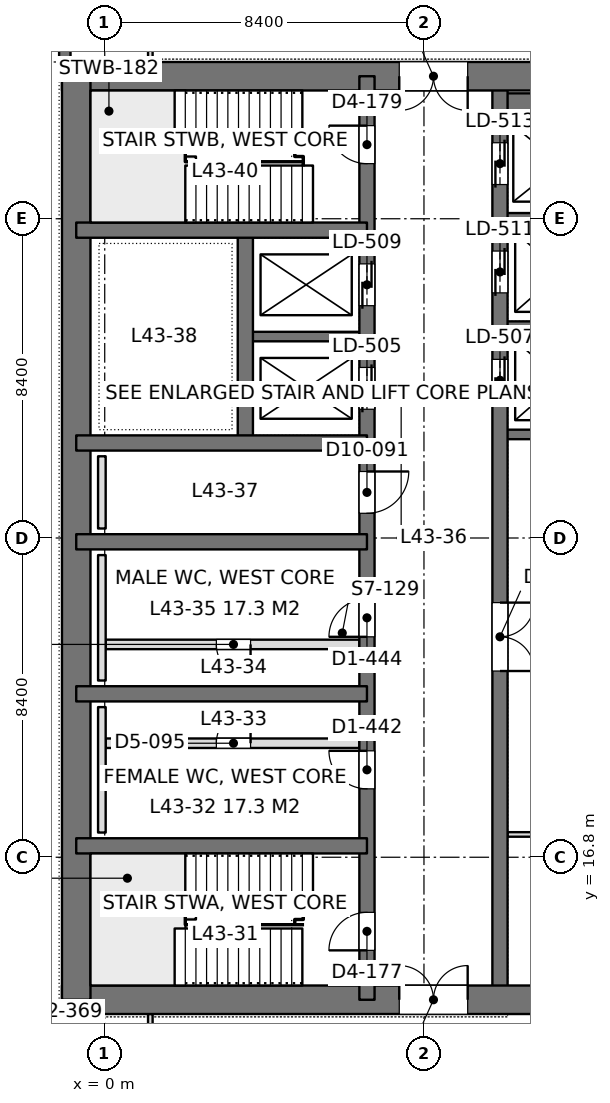
"""IFC4 building model, lengths in metres.
Left out: names, types, materials, properties, quantities, classifications, styles, units other than length and angle.
Written with IfcOpenShell. Run it as: python <this file> out.ifc"""

import sys

from ifc_helpers import new_model, si_unit, direction, frame, frame_2d, origin, place, context, subcontext, project, spatial, rectangle, extrude, element, fill, save


model = new_model("IFC4")
c1 = context("Model", 3, precision=1e-05, world=origin(), true_north=direction((0.0, 1.0)))
c2 = subcontext(c1, "Body", "Model", "MODEL_VIEW")
j1 = project(units=[si_unit("LENGTHUNIT", "METRE"), si_unit("PLANEANGLEUNIT", "RADIAN")], contexts=[c1])
p1 = place(None, origin())
s1 = spatial("IfcSite", under=j1, at=p1, CompositionType="ELEMENT")
p2 = place(p1, origin())
s2 = spatial("IfcBuilding", under=s1, at=p2, CompositionType="ELEMENT")
p3 = place(p2, frame((0.0, 0.0, 190.2)))
s3 = spatial("IfcBuildingStorey", under=s2, at=p3, CompositionType="ELEMENT", Elevation=190.2)
p4 = place(p3, frame((-1.125, 13.05, 0.0), z_axis=(0.0, 0.0, 1.0), x_axis=(1.0, 0.0, 0.0)))
e1 = element("IfcWall", 1, at=p4, inside=s3, PredefinedType="SHEAR", context=c2, shape_type="SweptSolid", body=[
    extrude(rectangle(XDim=17.85, YDim=0.75, at=frame_2d((8.925, 0.0))), origin(), (0.0, 0.0, 1.0), 4.2),
])
p5 = place(p4, frame((8.875, 0.0, 0.0)))
e2 = element("IfcOpeningElement", 2, at=p5, cuts=e1, PredefinedType="OPENING", context=c2, shape_type="SweptSolid", body=[
    extrude(rectangle(XDim=1.8, YDim=2.4, at=frame_2d((0.9, 1.2))), frame((0.0, 0.385, 0.0), z_axis=(0.0, -1.0, 0.0), x_axis=(1.0, 0.0, 0.0)), (0.0, 0.0, 1.0), 0.77),
])
p6 = place(p3, frame((-1.125, 37.35, 0.0), z_axis=(0.0, 0.0, 1.0), x_axis=(1.0, 0.0, 0.0)))
e3 = element("IfcWall", 3, at=p6, inside=s3, PredefinedType="SHEAR", context=c2, shape_type="SweptSolid", body=[
    extrude(rectangle(XDim=17.85, YDim=0.75, at=frame_2d((8.925, 0.0))), origin(), (0.0, 0.0, 1.0), 4.2),
])
p7 = place(p6, frame((8.875, 0.0, 0.0)))
e4 = element("IfcOpeningElement", 4, at=p7, cuts=e3, PredefinedType="OPENING", context=c2, shape_type="SweptSolid", body=[
    extrude(rectangle(XDim=1.8, YDim=2.4, at=frame_2d((0.9, 1.2))), frame((0.0, 0.385, 0.0), z_axis=(0.0, -1.0, 0.0), x_axis=(1.0, 0.0, 0.0)), (0.0, 0.0, 1.0), 0.77),
])
p8 = place(p3, frame((-0.75, 13.05, 0.0), z_axis=(0.0, 0.0, 1.0), x_axis=(0.0, 1.0, 0.0)))
e5 = element("IfcWall", 5, at=p8, inside=s3, PredefinedType="SHEAR", context=c2, shape_type="SweptSolid", body=[
    extrude(rectangle(XDim=24.3, YDim=0.75, at=frame_2d((12.15, 0.0))), origin(), (0.0, 0.0, 1.0), 4.2),
])
p9 = place(p3, frame((6.9, 13.05, 0.0), z_axis=(0.0, 0.0, 1.0), x_axis=(0.0, 1.0, 0.0)))
e6 = element("IfcWall", 6, at=p9, inside=s3, PredefinedType="SHEAR", context=c2, shape_type="SweptSolid", body=[
    extrude(rectangle(XDim=24.3, YDim=0.4, at=frame_2d((12.15, 0.0))), origin(), (0.0, 0.0, 1.0), 4.2),
])
p10 = place(p9, frame((1.3, 0.0, 0.0)))
e7 = element("IfcOpeningElement", 7, at=p10, cuts=e6, PredefinedType="OPENING", context=c2, shape_type="SweptSolid", body=[
    extrude(rectangle(XDim=1.0, YDim=2.2, at=frame_2d((0.5, 1.1))), frame((0.0, 0.21, 0.0), z_axis=(0.0, -1.0, 0.0), x_axis=(1.0, 0.0, 0.0)), (0.0, 0.0, 1.0), 0.42),
])
p11 = place(p9, frame((22.0, 0.0, 0.0)))
e8 = element("IfcOpeningElement", 8, at=p11, cuts=e6, PredefinedType="OPENING", context=c2, shape_type="SweptSolid", body=[
    extrude(rectangle(XDim=1.0, YDim=2.2, at=frame_2d((0.5, 1.1))), frame((0.0, 0.21, 0.0), z_axis=(0.0, -1.0, 0.0), x_axis=(1.0, 0.0, 0.0)), (0.0, 0.0, 1.0), 0.42),
])
p12 = place(p9, frame((5.55, 0.0, 0.0)))
e9 = element("IfcOpeningElement", 9, at=p12, cuts=e6, PredefinedType="OPENING", context=c2, shape_type="SweptSolid", body=[
    extrude(rectangle(XDim=1.0, YDim=2.2, at=frame_2d((0.5, 1.1))), frame((0.0, 0.21, 0.0), z_axis=(0.0, -1.0, 0.0), x_axis=(1.0, 0.0, 0.0)), (0.0, 0.0, 1.0), 0.42),
])
p13 = place(p9, frame((9.55, 0.0, 0.0)))
e10 = element("IfcOpeningElement", 10, at=p13, cuts=e6, PredefinedType="OPENING", context=c2, shape_type="SweptSolid", body=[
    extrude(rectangle(XDim=1.0, YDim=2.2, at=frame_2d((0.5, 1.1))), frame((0.0, 0.21, 0.0), z_axis=(0.0, -1.0, 0.0), x_axis=(1.0, 0.0, 0.0)), (0.0, 0.0, 1.0), 0.42),
])
p14 = place(p9, frame((12.8, 0.0, 0.0)))
e11 = element("IfcOpeningElement", 11, at=p14, cuts=e6, PredefinedType="OPENING", context=c2, shape_type="SweptSolid", body=[
    extrude(rectangle(XDim=1.1, YDim=2.2, at=frame_2d((0.55, 1.1))), frame((0.0, 0.21, 0.0), z_axis=(0.0, -1.0, 0.0), x_axis=(1.0, 0.0, 0.0)), (0.0, 0.0, 1.0), 0.42),
])
p15 = place(p9, frame((15.538, 0.0, 0.0)))
e12 = element("IfcOpeningElement", 12, at=p15, cuts=e6, PredefinedType="OPENING", context=c2, shape_type="SweptSolid", body=[
    extrude(rectangle(XDim=1.1, YDim=2.2, at=frame_2d((0.55, 1.1))), frame((0.0, 0.21, 0.0), z_axis=(0.0, -1.0, 0.0), x_axis=(1.0, 0.0, 0.0)), (0.0, 0.0, 1.0), 0.42),
])
p16 = place(p9, frame((18.262, 0.0, 0.0)))
e13 = element("IfcOpeningElement", 13, at=p16, cuts=e6, PredefinedType="OPENING", context=c2, shape_type="SweptSolid", body=[
    extrude(rectangle(XDim=1.1, YDim=2.2, at=frame_2d((0.55, 1.1))), frame((0.0, 0.21, 0.0), z_axis=(0.0, -1.0, 0.0), x_axis=(1.0, 0.0, 0.0)), (0.0, 0.0, 1.0), 0.42),
])
p17 = place(p3, frame((10.4, 13.05, 0.0), z_axis=(0.0, 0.0, 1.0), x_axis=(0.0, 1.0, 0.0)))
e14 = element("IfcWall", 14, at=p17, inside=s3, PredefinedType="SHEAR", context=c2, shape_type="SweptSolid", body=[
    extrude(rectangle(XDim=24.3, YDim=0.4, at=frame_2d((12.15, 0.0))), origin(), (0.0, 0.0, 1.0), 4.2),
])
p18 = place(p17, frame((15.75, 0.0, 0.0)))
e15 = element("IfcOpeningElement", 15, at=p18, cuts=e14, PredefinedType="OPENING", context=c2, shape_type="SweptSolid", body=[
    extrude(rectangle(XDim=1.1, YDim=2.2, at=frame_2d((0.55, 1.1))), frame((0.0, 0.21, 0.0), z_axis=(0.0, -1.0, 0.0), x_axis=(1.0, 0.0, 0.0)), (0.0, 0.0, 1.0), 0.42),
])
p19 = place(p17, frame((18.6, 0.0, 0.0)))
e16 = element("IfcOpeningElement", 16, at=p19, cuts=e14, PredefinedType="OPENING", context=c2, shape_type="SweptSolid", body=[
    extrude(rectangle(XDim=1.1, YDim=2.2, at=frame_2d((0.55, 1.1))), frame((0.0, 0.21, 0.0), z_axis=(0.0, -1.0, 0.0), x_axis=(1.0, 0.0, 0.0)), (0.0, 0.0, 1.0), 0.42),
])
p20 = place(p17, frame((21.45, 0.0, 0.0)))
e17 = element("IfcOpeningElement", 17, at=p20, cuts=e14, PredefinedType="OPENING", context=c2, shape_type="SweptSolid", body=[
    extrude(rectangle(XDim=1.1, YDim=2.2, at=frame_2d((0.55, 1.1))), frame((0.0, 0.21, 0.0), z_axis=(0.0, -1.0, 0.0), x_axis=(1.0, 0.0, 0.0)), (0.0, 0.0, 1.0), 0.42),
])
p21 = place(p17, frame((8.65, 0.0, 0.0)))
e18 = element("IfcOpeningElement", 18, at=p21, cuts=e14, PredefinedType="OPENING", context=c2, shape_type="SweptSolid", body=[
    extrude(rectangle(XDim=1.8, YDim=2.4, at=frame_2d((0.9, 1.2))), frame((0.0, 0.21, 0.0), z_axis=(0.0, -1.0, 0.0), x_axis=(1.0, 0.0, 0.0)), (0.0, 0.0, 1.0), 0.42),
])
for number, where, z_axis, x_axis in (
    (19, (-0.75, 17.1, 0.0), (0.0, 0.0, 1.0), (1.0, 0.0, 0.0)),
    (20, (-0.75, 21.1, 0.0), (0.0, 0.0, 1.0), (1.0, 0.0, 0.0)),
    (21, (-0.75, 25.1, 0.0), (0.0, 0.0, 1.0), (1.0, 0.0, 0.0)),
    (22, (-0.75, 27.7, 0.0), (0.0, 0.0, 1.0), (1.0, 0.0, 0.0)),
    (23, (-0.75, 33.3, 0.0), (0.0, 0.0, 1.0), (1.0, 0.0, 0.0)),
):
    element("IfcWall", number, at=place(p3, frame(where, z_axis=z_axis, x_axis=x_axis)), inside=s3, PredefinedType="SHEAR", context=c2, shape_type="SweptSolid", body=[
        extrude(rectangle(XDim=7.65, YDim=0.4, at=frame_2d((3.825, 0.0))), origin(), (0.0, 0.0, 1.0), 4.2),
    ])
p22 = place(p3, frame((3.7, 27.7, 0.0), z_axis=(0.0, 0.0, 1.0), x_axis=(0.0, 1.0, 0.0)))
e24 = element("IfcWall", 24, at=p22, inside=s3, PredefinedType="SHEAR", context=c2, shape_type="SweptSolid", body=[
    extrude(rectangle(XDim=5.6, YDim=0.4, at=frame_2d((2.8, 0.0))), origin(), (0.0, 0.0, 1.0), 4.2),
])
p23 = place(p3, frame((3.7, 30.5, 0.0), z_axis=(0.0, 0.0, 1.0), x_axis=(1.0, 0.0, 0.0)))
e25 = element("IfcWall", 25, at=p23, inside=s3, PredefinedType="SHEAR", context=c2, shape_type="SweptSolid", body=[
    extrude(rectangle(XDim=3.2, YDim=0.25, at=frame_2d((1.6, 0.0))), origin(), (0.0, 0.0, 1.0), 4.2),
])
p24 = place(p3, frame((10.4, 27.925, 0.0), z_axis=(0.0, 0.0, 1.0), x_axis=(1.0, 0.0, 0.0)))
e26 = element("IfcWall", 26, at=p24, inside=s3, PredefinedType="SHEAR", context=c2, shape_type="SweptSolid", body=[
    extrude(rectangle(XDim=5.95, YDim=0.25, at=frame_2d((2.975, 0.0))), origin(), (0.0, 0.0, 1.0), 4.2),
])
for number, where, z_axis, x_axis in (
    (27, (10.4, 30.775, 0.0), (0.0, 0.0, 1.0), (1.0, 0.0, 0.0)),
    (28, (10.4, 33.625, 0.0), (0.0, 0.0, 1.0), (1.0, 0.0, 0.0)),
):
    element("IfcWall", number, at=place(p3, frame(where, z_axis=z_axis, x_axis=x_axis)), inside=s3, PredefinedType="SHEAR", context=c2, shape_type="SweptSolid", body=[
        extrude(rectangle(XDim=3.2, YDim=0.25, at=frame_2d((1.6, 0.0))), origin(), (0.0, 0.0, 1.0), 4.2),
    ])
p25 = place(p3, frame((10.4, 36.625, 0.0), z_axis=(0.0, 0.0, 1.0), x_axis=(1.0, 0.0, 0.0)))
e29 = element("IfcWall", 29, at=p25, inside=s3, PredefinedType="SHEAR", context=c2, shape_type="SweptSolid", body=[
    extrude(rectangle(XDim=3.2, YDim=0.55, at=frame_2d((1.6, 0.0))), origin(), (0.0, 0.0, 1.0), 4.2),
])
p26 = place(p3, frame((-1.05, 8.4, 0.0), z_axis=(0.0, 0.0, 1.0), x_axis=(0.0, 1.0, 0.0)))
e30 = element("IfcWall", 30, at=p26, inside=s3, PredefinedType="SOLIDWALL", context=c2, shape_type="SweptSolid", body=[
    extrude(rectangle(XDim=4.275, YDim=0.3, at=frame_2d((2.138, 0.0))), origin(), (0.0, 0.0, 1.0), 4.05),
])
p27 = place(p26, frame((0.938, 0.0, 0.9)))
e31 = element("IfcOpeningElement", 31, at=p27, cuts=e30, PredefinedType="OPENING", context=c2, shape_type="SweptSolid", body=[
    extrude(rectangle(XDim=2.4, YDim=1.9, at=frame_2d((1.2, 0.95))), frame((0.0, 0.16, 0.0), z_axis=(0.0, -1.0, 0.0), x_axis=(1.0, 0.0, 0.0)), (0.0, 0.0, 1.0), 0.32),
])
p28 = place(p3, frame((-1.05, 37.725, 0.0), z_axis=(0.0, 0.0, 1.0), x_axis=(0.0, 1.0, 0.0)))
e32 = element("IfcWall", 32, at=p28, inside=s3, PredefinedType="SOLIDWALL", context=c2, shape_type="SweptSolid", body=[
    extrude(rectangle(XDim=4.275, YDim=0.3, at=frame_2d((2.137, 0.0))), origin(), (0.0, 0.0, 1.0), 4.05),
])
p29 = place(p28, frame((0.938, 0.0, 0.9)))
e33 = element("IfcOpeningElement", 33, at=p29, cuts=e32, PredefinedType="OPENING", context=c2, shape_type="SweptSolid", body=[
    extrude(rectangle(XDim=2.4, YDim=1.9, at=frame_2d((1.2, 0.95))), frame((0.0, 0.16, 0.0), z_axis=(0.0, -1.0, 0.0), x_axis=(1.0, 0.0, 0.0)), (0.0, 0.0, 1.0), 0.32),
])
p30 = place(p3, frame((10.598, 17.4, 0.0), z_axis=(0.0, 0.0, 1.0), x_axis=(1.0, 0.0, 0.0)))
e34 = element("IfcWall", 34, at=p30, inside=s3, PredefinedType="PARTITIONING", context=c2, shape_type="SweptSolid", body=[
    extrude(rectangle(XDim=5.904, YDim=0.12, at=frame_2d((2.952, 0.0))), origin(), (0.0, 0.0, 1.0), 3.55),
])
p31 = place(p3, frame((1.2, 10.7, 0.0), z_axis=(0.0, 0.0, 1.0), x_axis=(0.0, 1.0, 0.0)))
e35 = element("IfcWall", 35, at=p31, inside=s3, PredefinedType="PARTITIONING", context=c2, shape_type="SweptSolid", body=[
    extrude(rectangle(XDim=1.976, YDim=0.12, at=frame_2d((0.988, 0.0))), origin(), (0.0, 0.0, 1.0), 4.05),
])
p32 = place(p3, frame((1.2, 37.724, 0.0), z_axis=(0.0, 0.0, 1.0), x_axis=(0.0, 1.0, 0.0)))
e36 = element("IfcWall", 36, at=p32, inside=s3, PredefinedType="PARTITIONING", context=c2, shape_type="SweptSolid", body=[
    extrude(rectangle(XDim=1.976, YDim=0.12, at=frame_2d((0.988, 0.0))), origin(), (0.0, 0.0, 1.0), 4.05),
])
p33 = place(p3, frame((0.025, 22.4, 0.0), z_axis=(0.0, 0.0, 1.0), x_axis=(1.0, 0.0, 0.0)))
e37 = element("IfcWall", 37, at=p33, inside=s3, PredefinedType="PARTITIONING", context=c2, shape_type="SweptSolid", body=[
    extrude(rectangle(XDim=6.675, YDim=0.25, at=frame_2d((3.337, 0.0))), origin(), (0.0, 0.0, 1.0), 4.0),
])
p34 = place(p33, frame((2.913, 0.0, 0.0)))
e38 = element("IfcOpeningElement", 38, at=p34, cuts=e37, PredefinedType="OPENING", context=c2, shape_type="SweptSolid", body=[
    extrude(rectangle(XDim=0.9, YDim=2.2, at=frame_2d((0.45, 1.1))), frame((0.0, 0.135, 0.0), z_axis=(0.0, -1.0, 0.0), x_axis=(1.0, 0.0, 0.0)), (0.0, 0.0, 1.0), 0.27),
])
p35 = place(p3, frame((0.025, 19.8, 0.0), z_axis=(0.0, 0.0, 1.0), x_axis=(1.0, 0.0, 0.0)))
e39 = element("IfcWall", 39, at=p35, inside=s3, PredefinedType="PARTITIONING", context=c2, shape_type="SweptSolid", body=[
    extrude(rectangle(XDim=6.675, YDim=0.25, at=frame_2d((3.337, 0.0))), origin(), (0.0, 0.0, 1.0), 4.0),
])
p36 = place(p35, frame((2.913, 0.0, 0.0)))
e40 = element("IfcOpeningElement", 40, at=p36, cuts=e39, PredefinedType="OPENING", context=c2, shape_type="SweptSolid", body=[
    extrude(rectangle(XDim=0.9, YDim=2.2, at=frame_2d((0.45, 1.1))), frame((0.0, 0.135, 0.0), z_axis=(0.0, -1.0, 0.0), x_axis=(1.0, 0.0, 0.0)), (0.0, 0.0, 1.0), 0.27),
])
for number, where, z_axis, x_axis in (
    (41, (-0.075, 17.45, 0.0), (0.0, 0.0, 1.0), (0.0, 1.0, 0.0)),
    (42, (-0.075, 21.45, 0.0), (0.0, 0.0, 1.0), (0.0, 1.0, 0.0)),
):
    element("IfcWall", number, at=place(p3, frame(where, z_axis=z_axis, x_axis=x_axis)), inside=s3, PredefinedType="PLUMBINGWALL", context=c2, shape_type="SweptSolid", body=[
        extrude(rectangle(XDim=3.3, YDim=0.2, at=frame_2d((1.65, 0.0))), origin(), (0.0, 0.0, 1.0), 1.2),
    ])
p37 = place(p3, frame((-0.075, 25.45, 0.0), z_axis=(0.0, 0.0, 1.0), x_axis=(0.0, 1.0, 0.0)))
e43 = element("IfcWall", 43, at=p37, inside=s3, PredefinedType="PLUMBINGWALL", context=c2, shape_type="SweptSolid", body=[
    extrude(rectangle(XDim=1.9, YDim=0.2, at=frame_2d((0.95, 0.0))), origin(), (0.0, 0.0, 1.0), 1.2),
])
p38 = place(p5, origin())
e44 = element("IfcDoor", 44, at=p38, inside=s3, OperationType="DOUBLE_DOOR_SINGLE_SWING", PredefinedType="DOOR", context=c2, shape_type="SweptSolid", body=[
    extrude(rectangle(XDim=1.8, YDim=2.4, at=frame_2d((0.9, 1.2))), frame((0.0, 0.025, 0.0), z_axis=(0.0, -1.0, 0.0), x_axis=(1.0, 0.0, 0.0)), (0.0, 0.0, 1.0), 0.05),
])
fill(e2, e44)
p39 = place(p7, frame((1.8, 0.0, 0.0), z_axis=(0.0, 0.0, 1.0), x_axis=(-1.0, 0.0, 0.0)))
e45 = element("IfcDoor", 45, at=p39, inside=s3, OperationType="DOUBLE_DOOR_SINGLE_SWING", PredefinedType="DOOR", context=c2, shape_type="SweptSolid", body=[
    extrude(rectangle(XDim=1.8, YDim=2.4, at=frame_2d((0.9, 1.2))), frame((0.0, 0.025, 0.0), z_axis=(0.0, -1.0, 0.0), x_axis=(1.0, 0.0, 0.0)), (0.0, 0.0, 1.0), 0.05),
])
fill(e4, e45)
p40 = place(p10, origin())
e46 = element("IfcDoor", 46, at=p40, inside=s3, OperationType="SINGLE_SWING_LEFT", PredefinedType="DOOR", context=c2, shape_type="SweptSolid", body=[
    extrude(rectangle(XDim=1.0, YDim=2.2, at=frame_2d((0.5, 1.1))), frame((0.0, 0.025, 0.0), z_axis=(0.0, -1.0, 0.0), x_axis=(1.0, 0.0, 0.0)), (0.0, 0.0, 1.0), 0.05),
])
fill(e7, e46)
p41 = place(p11, origin())
e47 = element("IfcDoor", 47, at=p41, inside=s3, OperationType="SINGLE_SWING_RIGHT", PredefinedType="DOOR", context=c2, shape_type="SweptSolid", body=[
    extrude(rectangle(XDim=1.0, YDim=2.2, at=frame_2d((0.5, 1.1))), frame((0.0, 0.025, 0.0), z_axis=(0.0, -1.0, 0.0), x_axis=(1.0, 0.0, 0.0)), (0.0, 0.0, 1.0), 0.05),
])
fill(e8, e47)
p42 = place(p12, origin())
e48 = element("IfcDoor", 48, at=p42, inside=s3, OperationType="SINGLE_SWING_RIGHT", PredefinedType="DOOR", context=c2, shape_type="SweptSolid", body=[
    extrude(rectangle(XDim=1.0, YDim=2.2, at=frame_2d((0.5, 1.1))), frame((0.0, 0.025, 0.0), z_axis=(0.0, -1.0, 0.0), x_axis=(1.0, 0.0, 0.0)), (0.0, 0.0, 1.0), 0.05),
])
fill(e9, e48)
p43 = place(p13, origin())
e49 = element("IfcDoor", 49, at=p43, inside=s3, OperationType="SINGLE_SWING_LEFT", PredefinedType="DOOR", context=c2, shape_type="SweptSolid", body=[
    extrude(rectangle(XDim=1.0, YDim=2.2, at=frame_2d((0.5, 1.1))), frame((0.0, 0.025, 0.0), z_axis=(0.0, -1.0, 0.0), x_axis=(1.0, 0.0, 0.0)), (0.0, 0.0, 1.0), 0.05),
])
fill(e10, e49)
p44 = place(p14, frame((1.1, 0.0, 0.0), z_axis=(0.0, 0.0, 1.0), x_axis=(-1.0, 0.0, 0.0)))
e50 = element("IfcDoor", 50, at=p44, inside=s3, OperationType="SINGLE_SWING_LEFT", PredefinedType="DOOR", context=c2, shape_type="SweptSolid", body=[
    extrude(rectangle(XDim=1.1, YDim=2.2, at=frame_2d((0.55, 1.1))), frame((0.0, 0.025, 0.0), z_axis=(0.0, -1.0, 0.0), x_axis=(1.0, 0.0, 0.0)), (0.0, 0.0, 1.0), 0.05),
])
fill(e11, e50)
p45 = place(p18, origin())
e51 = element("IfcDoor", 51, at=p45, inside=s3, OperationType="DOUBLE_DOOR_SLIDING", PredefinedType="DOOR", context=c2, shape_type="SweptSolid", body=[
    extrude(rectangle(XDim=1.1, YDim=2.2, at=frame_2d((0.55, 1.1))), frame((0.0, 0.025, 0.0), z_axis=(0.0, -1.0, 0.0), x_axis=(1.0, 0.0, 0.0)), (0.0, 0.0, 1.0), 0.05),
])
fill(e15, e51)
p46 = place(p19, origin())
e52 = element("IfcDoor", 52, at=p46, inside=s3, OperationType="DOUBLE_DOOR_SLIDING", PredefinedType="DOOR", context=c2, shape_type="SweptSolid", body=[
    extrude(rectangle(XDim=1.1, YDim=2.2, at=frame_2d((0.55, 1.1))), frame((0.0, 0.025, 0.0), z_axis=(0.0, -1.0, 0.0), x_axis=(1.0, 0.0, 0.0)), (0.0, 0.0, 1.0), 0.05),
])
fill(e16, e52)
p47 = place(p20, origin())
e53 = element("IfcDoor", 53, at=p47, inside=s3, OperationType="DOUBLE_DOOR_SLIDING", PredefinedType="DOOR", context=c2, shape_type="SweptSolid", body=[
    extrude(rectangle(XDim=1.1, YDim=2.2, at=frame_2d((0.55, 1.1))), frame((0.0, 0.025, 0.0), z_axis=(0.0, -1.0, 0.0), x_axis=(1.0, 0.0, 0.0)), (0.0, 0.0, 1.0), 0.05),
])
fill(e17, e53)
p48 = place(p15, origin())
e54 = element("IfcDoor", 54, at=p48, inside=s3, OperationType="DOUBLE_DOOR_SLIDING", PredefinedType="DOOR", context=c2, shape_type="SweptSolid", body=[
    extrude(rectangle(XDim=1.1, YDim=2.2, at=frame_2d((0.55, 1.1))), frame((0.0, 0.025, 0.0), z_axis=(0.0, -1.0, 0.0), x_axis=(1.0, 0.0, 0.0)), (0.0, 0.0, 1.0), 0.05),
])
fill(e12, e54)
p49 = place(p16, origin())
e55 = element("IfcDoor", 55, at=p49, inside=s3, OperationType="DOUBLE_DOOR_SLIDING", PredefinedType="DOOR", context=c2, shape_type="SweptSolid", body=[
    extrude(rectangle(XDim=1.1, YDim=2.2, at=frame_2d((0.55, 1.1))), frame((0.0, 0.025, 0.0), z_axis=(0.0, -1.0, 0.0), x_axis=(1.0, 0.0, 0.0)), (0.0, 0.0, 1.0), 0.05),
])
fill(e13, e55)
p50 = place(p21, frame((1.8, 0.0, 0.0), z_axis=(0.0, 0.0, 1.0), x_axis=(-1.0, 0.0, 0.0)))
e56 = element("IfcDoor", 56, at=p50, inside=s3, OperationType="DOUBLE_DOOR_SINGLE_SWING", PredefinedType="DOOR", context=c2, shape_type="SweptSolid", body=[
    extrude(rectangle(XDim=1.8, YDim=2.4, at=frame_2d((0.9, 1.2))), frame((0.0, 0.025, 0.0), z_axis=(0.0, -1.0, 0.0), x_axis=(1.0, 0.0, 0.0)), (0.0, 0.0, 1.0), 0.05),
])
fill(e18, e56)
p51 = place(p34, frame((0.9, 0.0, 0.0), z_axis=(0.0, 0.0, 1.0), x_axis=(-1.0, 0.0, 0.0)))
e57 = element("IfcDoor", 57, at=p51, inside=s3, OperationType="SINGLE_SWING_LEFT", PredefinedType="DOOR", context=c2, shape_type="SweptSolid", body=[
    extrude(rectangle(XDim=0.9, YDim=2.2, at=frame_2d((0.45, 1.1))), frame((0.0, 0.025, 0.0), z_axis=(0.0, -1.0, 0.0), x_axis=(1.0, 0.0, 0.0)), (0.0, 0.0, 1.0), 0.05),
])
fill(e38, e57)
p52 = place(p36, origin())
e58 = element("IfcDoor", 58, at=p52, inside=s3, OperationType="SINGLE_SWING_RIGHT", PredefinedType="DOOR", context=c2, shape_type="SweptSolid", body=[
    extrude(rectangle(XDim=0.9, YDim=2.2, at=frame_2d((0.45, 1.1))), frame((0.0, 0.025, 0.0), z_axis=(0.0, -1.0, 0.0), x_axis=(1.0, 0.0, 0.0)), (0.0, 0.0, 1.0), 0.05),
])
fill(e40, e58)
save(model, sys.argv[1])
